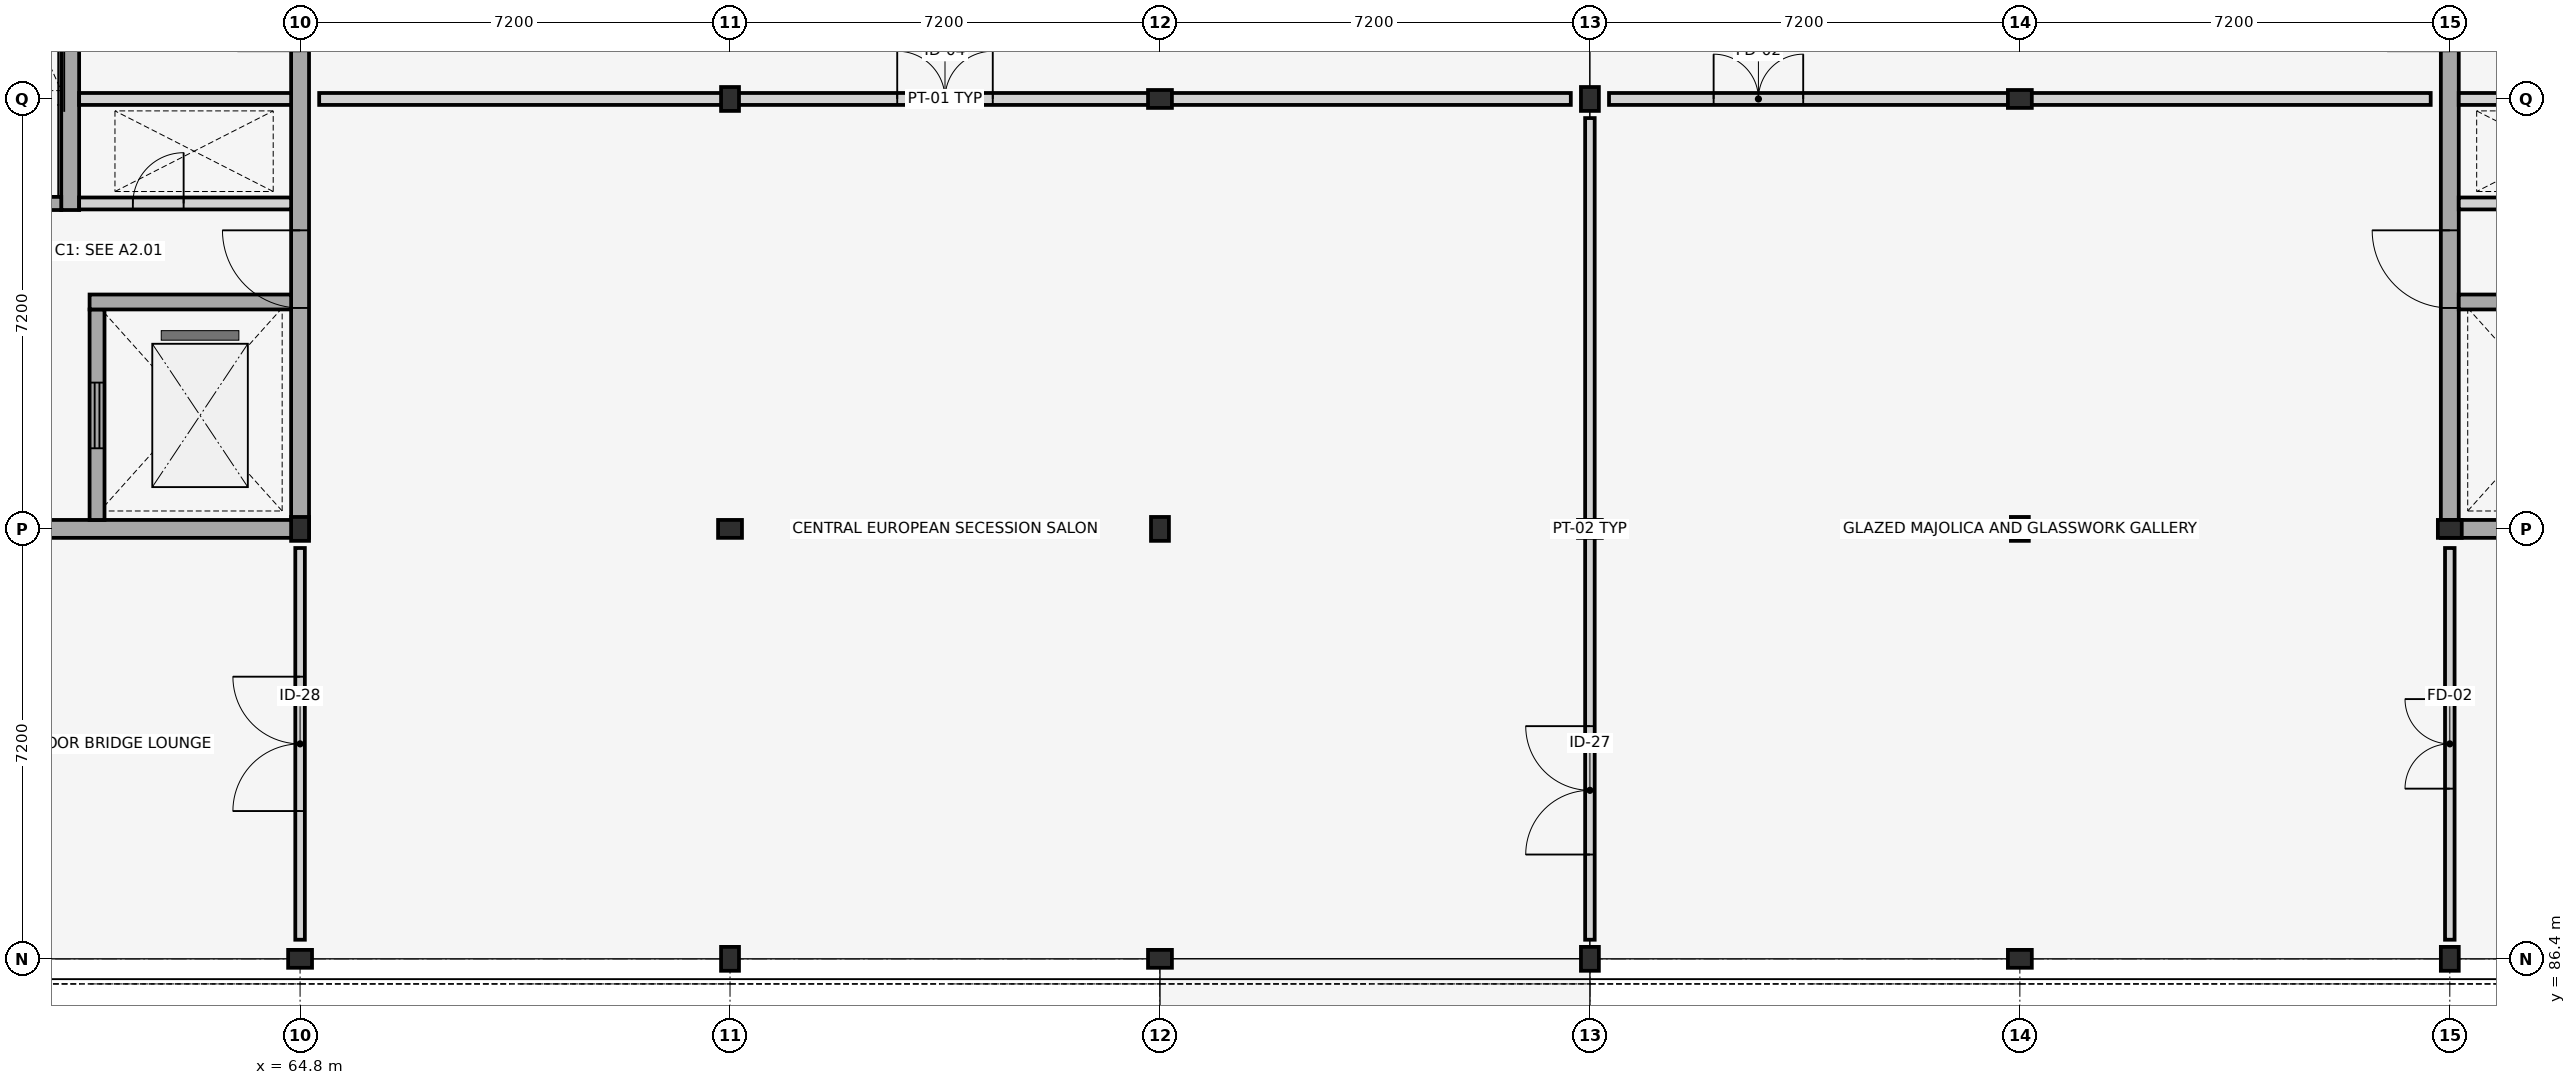
"""IFC4 building model, lengths in metres.
Left out: names, types, materials, properties, quantities, classifications, styles, units other than length and angle.
Written with IfcOpenShell. Run it as: python <this file> out.ifc"""

import sys

from ifc_helpers import new_model, si_unit, direction, frame, frame_2d, origin, origin_2d, place, context, subcontext, project, spatial, rectangle, i_section, extrude, element, fill, save


model = new_model("IFC4")
c1 = context("Model", 3, precision=1e-05, world=origin(), true_north=direction((0.0, 1.0)))
c2 = subcontext(c1, "Body", "Model", "MODEL_VIEW")
j1 = project(units=[si_unit("LENGTHUNIT", "METRE"), si_unit("PLANEANGLEUNIT", "RADIAN")], contexts=[c1])
p1 = place(None, origin())
s1 = spatial("IfcSite", under=j1, at=p1, CompositionType="ELEMENT")
p2 = place(p1, origin())
s2 = spatial("IfcBuilding", under=s1, at=p2, CompositionType="ELEMENT")
p3 = place(p2, frame((0.0, 0.0, 8.7)))
s3 = spatial("IfcBuildingStorey", under=s2, at=p3, CompositionType="ELEMENT", Elevation=8.7)
for number, where, z_axis, x_axis in (
    (1, (64.8, 86.4, 0.0), (0.0, 0.0, 1.0), (0.0, 1.0, 0.0)),
    (2, (64.8, 93.6, 0.0), (0.0, 0.0, 1.0), (1.0, 0.0, 0.0)),
    (3, (72.0, 86.4, 0.0), (0.0, 0.0, 1.0), (1.0, 0.0, 0.0)),
    (4, (72.0, 93.6, 0.0), (0.0, 0.0, 1.0), (0.0, 1.0, 0.0)),
    (5, (72.0, 100.8, 0.0), (0.0, 0.0, 1.0), (1.0, 0.0, 0.0)),
    (6, (79.2, 86.4, 0.0), (0.0, 0.0, 1.0), (0.0, 1.0, 0.0)),
    (7, (79.2, 93.6, 0.0), (0.0, 0.0, 1.0), (1.0, 0.0, 0.0)),
    (8, (79.2, 100.8, 0.0), (0.0, 0.0, 1.0), (0.0, 1.0, 0.0)),
    (9, (86.4, 86.4, 0.0), (0.0, 0.0, 1.0), (1.0, 0.0, 0.0)),
    (10, (86.4, 93.6, 0.0), (0.0, 0.0, 1.0), (0.0, 1.0, 0.0)),
    (11, (86.4, 100.8, 0.0), (0.0, 0.0, 1.0), (1.0, 0.0, 0.0)),
    (12, (93.6, 86.4, 0.0), (0.0, 0.0, 1.0), (0.0, 1.0, 0.0)),
    (13, (93.6, 93.6, 0.0), (0.0, 0.0, 1.0), (1.0, 0.0, 0.0)),
    (14, (93.6, 100.8, 0.0), (0.0, 0.0, 1.0), (0.0, 1.0, 0.0)),
    (15, (100.8, 86.4, 0.0), (0.0, 0.0, 1.0), (1.0, 0.0, 0.0)),
    (16, (100.8, 93.6, 0.0), (0.0, 0.0, 1.0), (0.0, 1.0, 0.0)),
):
    element("IfcColumn", number, at=place(p3, frame(where, z_axis=z_axis, x_axis=x_axis)), inside=s3, PredefinedType="COLUMN", context=c2, shape_type="SweptSolid", body=[
        extrude(i_section(OverallWidth=0.3, OverallDepth=0.4, WebThickness=0.013, FlangeThickness=0.024, FilletRadius=0.027, at=origin_2d()), origin(), (0.0, 0.0, 1.0), 4.2),
    ])
p4 = place(p3, frame((57.6, 93.6, 0.0), z_axis=(0.0, 0.0, 1.0), x_axis=(1.0, 0.0, 0.0)))
e17 = element("IfcWall", 17, at=p4, inside=s3, PredefinedType="SHEAR", context=c2, shape_type="SweptSolid", body=[
    extrude(rectangle(XDim=7.35, YDim=0.3, at=frame_2d((3.675, 0.0))), origin(), (0.0, 0.0, 1.0), 3.96),
])
p5 = place(p3, frame((64.8, 93.75, 0.0), z_axis=(0.0, 0.0, 1.0), x_axis=(0.0, 1.0, 0.0)))
e18 = element("IfcWall", 18, at=p5, inside=s3, PredefinedType="SHEAR", context=c2, shape_type="SweptSolid", body=[
    extrude(rectangle(XDim=14.1, YDim=0.3, at=frame_2d((7.05, 0.0))), origin(), (0.0, 0.0, 1.0), 3.96),
])
p6 = place(p5, frame((3.55, 0.0, 0.0)))
e19 = element("IfcOpeningElement", 19, at=p6, cuts=e18, PredefinedType="OPENING", context=c2, shape_type="SweptSolid", body=[
    extrude(rectangle(XDim=1.3, YDim=2.2, at=frame_2d((0.65, 1.1))), frame((0.0, 0.16, 0.0), z_axis=(0.0, -1.0, 0.0), x_axis=(1.0, 0.0, 0.0)), (0.0, 0.0, 1.0), 0.32),
])
p7 = place(p5, frame((7.85, 0.0, 0.0)))
e20 = element("IfcOpeningElement", 20, at=p7, cuts=e18, PredefinedType="OPENING", context=c2, shape_type="SweptSolid", body=[
    extrude(rectangle(XDim=1.05, YDim=2.15, at=frame_2d((0.525, 1.075))), frame((0.0, 0.16, 0.0), z_axis=(0.0, -1.0, 0.0), x_axis=(1.0, 0.0, 0.0)), (0.0, 0.0, 1.0), 0.32),
])
p8 = place(p5, frame((10.55, 0.0, 0.0)))
e21 = element("IfcOpeningElement", 21, at=p8, cuts=e18, PredefinedType="OPENING", context=c2, shape_type="SweptSolid", body=[
    extrude(rectangle(XDim=1.0, YDim=2.15, at=frame_2d((0.5, 1.075))), frame((0.0, 0.16, 0.0), z_axis=(0.0, -1.0, 0.0), x_axis=(1.0, 0.0, 0.0)), (0.0, 0.0, 1.0), 0.32),
])
p9 = place(p3, frame((61.4, 93.75, 0.0), z_axis=(0.0, 0.0, 1.0), x_axis=(0.0, 1.0, 0.0)))
e22 = element("IfcWall", 22, at=p9, inside=s3, PredefinedType="SHEAR", context=c2, shape_type="SweptSolid", body=[
    extrude(rectangle(XDim=3.525, YDim=0.25, at=frame_2d((1.762, 0.0))), origin(), (0.0, 0.0, 1.0), 3.96),
])
p10 = place(p9, frame((1.2, 0.0, 0.0)))
e23 = element("IfcOpeningElement", 23, at=p10, cuts=e22, PredefinedType="OPENING", context=c2, shape_type="SweptSolid", body=[
    extrude(rectangle(XDim=1.1, YDim=2.15, at=frame_2d((0.55, 1.075))), frame((0.0, 0.135, 0.0), z_axis=(0.0, -1.0, 0.0), x_axis=(1.0, 0.0, 0.0)), (0.0, 0.0, 1.0), 0.27),
])
p11 = place(p3, frame((60.95, 98.94, 0.0), z_axis=(0.0, 0.0, 1.0), x_axis=(0.0, 1.0, 0.0)))
e24 = element("IfcWall", 24, at=p11, inside=s3, PredefinedType="SHEAR", context=c2, shape_type="SweptSolid", body=[
    extrude(rectangle(XDim=8.91, YDim=0.3, at=frame_2d((4.455, 0.0))), origin(), (0.0, 0.0, 1.0), 3.96),
])
p12 = place(p3, frame((61.1, 99.05, 0.0), z_axis=(0.0, 0.0, 1.0), x_axis=(1.0, 0.0, 0.0)))
e25 = element("IfcWall", 25, at=p12, inside=s3, PredefinedType="PLUMBINGWALL", context=c2, shape_type="SweptSolid", body=[
    extrude(rectangle(XDim=3.55, YDim=0.2, at=frame_2d((1.775, 0.0))), origin(), (0.0, 0.0, 1.0), 3.38),
])
p13 = place(p12, frame((0.9, 0.0, 0.0)))
e26 = element("IfcOpeningElement", 26, at=p13, cuts=e25, PredefinedType="OPENING", context=c2, shape_type="SweptSolid", body=[
    extrude(rectangle(XDim=0.85, YDim=2.05, at=frame_2d((0.425, 1.025))), frame((0.0, 0.11, 0.0), z_axis=(0.0, -1.0, 0.0), x_axis=(1.0, 0.0, 0.0)), (0.0, 0.0, 1.0), 0.22),
])
p14 = place(p3, frame((57.9, 99.05, 0.0), z_axis=(0.0, 0.0, 1.0), x_axis=(1.0, 0.0, 0.0)))
e27 = element("IfcWall", 27, at=p14, inside=s3, PredefinedType="SHEAR", context=c2, shape_type="SweptSolid", body=[
    extrude(rectangle(XDim=2.9, YDim=0.22, at=frame_2d((1.45, 0.0))), origin(), (0.0, 0.0, 1.0), 3.96),
])
p15 = place(p14, frame((0.75, 0.0, 0.0)))
e28 = element("IfcOpeningElement", 28, at=p15, cuts=e27, PredefinedType="OPENING", context=c2, shape_type="SweptSolid", body=[
    extrude(rectangle(XDim=1.3, YDim=2.2, at=frame_2d((0.65, 1.1))), frame((0.0, 0.12, 0.0), z_axis=(0.0, -1.0, 0.0), x_axis=(1.0, 0.0, 0.0)), (0.0, 0.0, 1.0), 0.24),
])
p16 = place(p3, frame((61.275, 97.4, 0.0), z_axis=(0.0, 0.0, 1.0), x_axis=(1.0, 0.0, 0.0)))
e29 = element("IfcWall", 29, at=p16, inside=s3, PredefinedType="SHEAR", context=c2, shape_type="SweptSolid", body=[
    extrude(rectangle(XDim=3.375, YDim=0.25, at=frame_2d((1.688, 0.0))), origin(), (0.0, 0.0, 1.0), 3.96),
])
p17 = place(p3, frame((61.1, 100.8, 0.0), z_axis=(0.0, 0.0, 1.0), x_axis=(1.0, 0.0, 0.0)))
e30 = element("IfcWall", 30, at=p17, inside=s3, PredefinedType="PLUMBINGWALL", context=c2, shape_type="SweptSolid", body=[
    extrude(rectangle(XDim=3.55, YDim=0.2, at=frame_2d((1.775, 0.0))), origin(), (0.0, 0.0, 1.0), 3.38),
])
p18 = place(p3, frame((100.65, 93.6, 0.0), z_axis=(0.0, 0.0, 1.0), x_axis=(1.0, 0.0, 0.0)))
e31 = element("IfcWall", 31, at=p18, inside=s3, PredefinedType="SHEAR", context=c2, shape_type="SweptSolid", body=[
    extrude(rectangle(XDim=7.35, YDim=0.3, at=frame_2d((3.675, 0.0))), origin(), (0.0, 0.0, 1.0), 3.96),
])
p19 = place(p3, frame((100.8, 93.75, 0.0), z_axis=(0.0, 0.0, 1.0), x_axis=(0.0, 1.0, 0.0)))
e32 = element("IfcWall", 32, at=p19, inside=s3, PredefinedType="SHEAR", context=c2, shape_type="SweptSolid", body=[
    extrude(rectangle(XDim=14.1, YDim=0.3, at=frame_2d((7.05, 0.0))), origin(), (0.0, 0.0, 1.0), 3.96),
])
p20 = place(p19, frame((3.55, 0.0, 0.0)))
e33 = element("IfcOpeningElement", 33, at=p20, cuts=e32, PredefinedType="OPENING", context=c2, shape_type="SweptSolid", body=[
    extrude(rectangle(XDim=1.3, YDim=2.2, at=frame_2d((0.65, 1.1))), frame((0.0, 0.16, 0.0), z_axis=(0.0, -1.0, 0.0), x_axis=(1.0, 0.0, 0.0)), (0.0, 0.0, 1.0), 0.32),
])
p21 = place(p19, frame((7.85, 0.0, 0.0)))
e34 = element("IfcOpeningElement", 34, at=p21, cuts=e32, PredefinedType="OPENING", context=c2, shape_type="SweptSolid", body=[
    extrude(rectangle(XDim=1.05, YDim=2.15, at=frame_2d((0.525, 1.075))), frame((0.0, 0.16, 0.0), z_axis=(0.0, -1.0, 0.0), x_axis=(1.0, 0.0, 0.0)), (0.0, 0.0, 1.0), 0.32),
])
p22 = place(p19, frame((10.55, 0.0, 0.0)))
e35 = element("IfcOpeningElement", 35, at=p22, cuts=e32, PredefinedType="OPENING", context=c2, shape_type="SweptSolid", body=[
    extrude(rectangle(XDim=1.0, YDim=2.15, at=frame_2d((0.5, 1.075))), frame((0.0, 0.16, 0.0), z_axis=(0.0, -1.0, 0.0), x_axis=(1.0, 0.0, 0.0)), (0.0, 0.0, 1.0), 0.32),
])
p23 = place(p3, frame((100.95, 99.05, 0.0), z_axis=(0.0, 0.0, 1.0), x_axis=(1.0, 0.0, 0.0)))
e36 = element("IfcWall", 36, at=p23, inside=s3, PredefinedType="PLUMBINGWALL", context=c2, shape_type="SweptSolid", body=[
    extrude(rectangle(XDim=3.55, YDim=0.2, at=frame_2d((1.775, 0.0))), origin(), (0.0, 0.0, 1.0), 3.38),
])
p24 = place(p23, frame((0.9, 0.0, 0.0)))
e37 = element("IfcOpeningElement", 37, at=p24, cuts=e36, PredefinedType="OPENING", context=c2, shape_type="SweptSolid", body=[
    extrude(rectangle(XDim=0.85, YDim=2.05, at=frame_2d((0.425, 1.025))), frame((0.0, 0.11, 0.0), z_axis=(0.0, -1.0, 0.0), x_axis=(1.0, 0.0, 0.0)), (0.0, 0.0, 1.0), 0.22),
])
p25 = place(p3, frame((100.95, 97.4, 0.0), z_axis=(0.0, 0.0, 1.0), x_axis=(1.0, 0.0, 0.0)))
e38 = element("IfcWall", 38, at=p25, inside=s3, PredefinedType="SHEAR", context=c2, shape_type="SweptSolid", body=[
    extrude(rectangle(XDim=3.375, YDim=0.25, at=frame_2d((1.688, 0.0))), origin(), (0.0, 0.0, 1.0), 3.96),
])
p26 = place(p3, frame((100.95, 100.8, 0.0), z_axis=(0.0, 0.0, 1.0), x_axis=(1.0, 0.0, 0.0)))
e39 = element("IfcWall", 39, at=p26, inside=s3, PredefinedType="PLUMBINGWALL", context=c2, shape_type="SweptSolid", body=[
    extrude(rectangle(XDim=3.55, YDim=0.2, at=frame_2d((1.775, 0.0))), origin(), (0.0, 0.0, 1.0), 3.38),
])
p27 = place(p3, frame((65.12, 100.8, 0.0), z_axis=(0.0, 0.0, 1.0), x_axis=(1.0, 0.0, 0.0)))
e40 = element("IfcWall", 40, at=p27, inside=s3, PredefinedType="PARTITIONING", context=c2, shape_type="SweptSolid", body=[
    extrude(rectangle(XDim=20.96, YDim=0.2, at=frame_2d((10.48, 0.0))), origin(), (0.0, 0.0, 1.0), 3.15),
])
p28 = place(p27, frame((9.68, 0.0, 0.0)))
e41 = element("IfcOpeningElement", 41, at=p28, cuts=e40, PredefinedType="OPENING", context=c2, shape_type="SweptSolid", body=[
    extrude(rectangle(XDim=1.6, YDim=2.35, at=frame_2d((0.8, 1.175))), frame((0.0, 0.11, 0.0), z_axis=(0.0, -1.0, 0.0), x_axis=(1.0, 0.0, 0.0)), (0.0, 0.0, 1.0), 0.22),
])
p29 = place(p3, frame((86.72, 100.8, 0.0), z_axis=(0.0, 0.0, 1.0), x_axis=(1.0, 0.0, 0.0)))
e42 = element("IfcWall", 42, at=p29, inside=s3, PredefinedType="PARTITIONING", context=c2, shape_type="SweptSolid", body=[
    extrude(rectangle(XDim=13.76, YDim=0.2, at=frame_2d((6.88, 0.0))), origin(), (0.0, 0.0, 1.0), 3.15),
])
p30 = place(p29, frame((1.752, 0.0, 0.0)))
e43 = element("IfcOpeningElement", 43, at=p30, cuts=e42, PredefinedType="OPENING", context=c2, shape_type="SweptSolid", body=[
    extrude(rectangle(XDim=1.5, YDim=2.25, at=frame_2d((0.75, 1.125))), frame((0.0, 0.11, 0.0), z_axis=(0.0, -1.0, 0.0), x_axis=(1.0, 0.0, 0.0)), (0.0, 0.0, 1.0), 0.22),
])
p31 = place(p3, frame((86.4, 86.72, 0.0), z_axis=(0.0, 0.0, 1.0), x_axis=(0.0, 1.0, 0.0)))
e44 = element("IfcWall", 44, at=p31, inside=s3, PredefinedType="PARTITIONING", context=c2, shape_type="SweptSolid", body=[
    extrude(rectangle(XDim=13.76, YDim=0.16, at=frame_2d((6.88, 0.0))), origin(), (0.0, 0.0, 1.0), 3.15),
])
p32 = place(p31, frame((1.427, 0.0, 0.0)))
e45 = element("IfcOpeningElement", 45, at=p32, cuts=e44, PredefinedType="OPENING", context=c2, shape_type="SweptSolid", body=[
    extrude(rectangle(XDim=2.15, YDim=2.65, at=frame_2d((1.075, 1.325))), frame((0.0, 0.09, 0.0), z_axis=(0.0, -1.0, 0.0), x_axis=(1.0, 0.0, 0.0)), (0.0, 0.0, 1.0), 0.18),
])
p33 = place(p3, frame((64.8, 86.72, 0.0), z_axis=(0.0, 0.0, 1.0), x_axis=(0.0, 1.0, 0.0)))
e46 = element("IfcWall", 46, at=p33, inside=s3, PredefinedType="PARTITIONING", context=c2, shape_type="SweptSolid", body=[
    extrude(rectangle(XDim=6.56, YDim=0.16, at=frame_2d((3.28, 0.0))), origin(), (0.0, 0.0, 1.0), 3.15),
])
p34 = place(p33, frame((2.155, 0.0, 0.0)))
e47 = element("IfcOpeningElement", 47, at=p34, cuts=e46, PredefinedType="OPENING", context=c2, shape_type="SweptSolid", body=[
    extrude(rectangle(XDim=2.25, YDim=2.7, at=frame_2d((1.125, 1.35))), frame((0.0, 0.09, 0.0), z_axis=(0.0, -1.0, 0.0), x_axis=(1.0, 0.0, 0.0)), (0.0, 0.0, 1.0), 0.18),
])
p35 = place(p3, frame((100.8, 86.72, 0.0), z_axis=(0.0, 0.0, 1.0), x_axis=(0.0, 1.0, 0.0)))
e48 = element("IfcWall", 48, at=p35, inside=s3, PredefinedType="PARTITIONING", context=c2, shape_type="SweptSolid", body=[
    extrude(rectangle(XDim=6.56, YDim=0.16, at=frame_2d((3.28, 0.0))), origin(), (0.0, 0.0, 1.0), 3.15),
])
p36 = place(p35, frame((2.53, 0.0, 0.0)))
e49 = element("IfcOpeningElement", 49, at=p36, cuts=e48, PredefinedType="OPENING", context=c2, shape_type="SweptSolid", body=[
    extrude(rectangle(XDim=1.5, YDim=2.25, at=frame_2d((0.75, 1.125))), frame((0.0, 0.09, 0.0), z_axis=(0.0, -1.0, 0.0), x_axis=(1.0, 0.0, 0.0)), (0.0, 0.0, 1.0), 0.18),
])
p37 = place(p6, origin())
e50 = element("IfcDoor", 50, at=p37, inside=s3, OperationType="SINGLE_SWING_RIGHT", PredefinedType="DOOR", context=c2, shape_type="SweptSolid", body=[
    extrude(rectangle(XDim=1.3, YDim=2.2, at=frame_2d((0.65, 1.1))), frame((0.0, 0.025, 0.0), z_axis=(0.0, -1.0, 0.0), x_axis=(1.0, 0.0, 0.0)), (0.0, 0.0, 1.0), 0.05),
])
fill(e19, e50)
p38 = place(p10, origin())
e51 = element("IfcDoor", 51, at=p38, inside=s3, OperationType="SLIDING_TO_LEFT", PredefinedType="DOOR", context=c2, shape_type="SweptSolid", body=[
    extrude(rectangle(XDim=1.1, YDim=2.15, at=frame_2d((0.55, 1.075))), frame((0.0, 0.025, 0.0), z_axis=(0.0, -1.0, 0.0), x_axis=(1.0, 0.0, 0.0)), (0.0, 0.0, 1.0), 0.05),
])
fill(e23, e51)
p39 = place(p13, origin())
e52 = element("IfcDoor", 52, at=p39, inside=s3, OperationType="SINGLE_SWING_RIGHT", PredefinedType="TRAPDOOR", context=c2, shape_type="SweptSolid", body=[
    extrude(rectangle(XDim=0.85, YDim=2.05, at=frame_2d((0.425, 1.025))), frame((0.0, 0.025, 0.0), z_axis=(0.0, -1.0, 0.0), x_axis=(1.0, 0.0, 0.0)), (0.0, 0.0, 1.0), 0.05),
])
fill(e26, e52)
p40 = place(p20, origin())
e53 = element("IfcDoor", 53, at=p40, inside=s3, OperationType="SINGLE_SWING_RIGHT", PredefinedType="DOOR", context=c2, shape_type="SweptSolid", body=[
    extrude(rectangle(XDim=1.3, YDim=2.2, at=frame_2d((0.65, 1.1))), frame((0.0, 0.025, 0.0), z_axis=(0.0, -1.0, 0.0), x_axis=(1.0, 0.0, 0.0)), (0.0, 0.0, 1.0), 0.05),
])
fill(e33, e53)
p41 = place(p28, origin())
e54 = element("IfcDoor", 54, at=p41, inside=s3, OperationType="DOUBLE_DOOR_SINGLE_SWING", PredefinedType="DOOR", context=c2, shape_type="SweptSolid", body=[
    extrude(rectangle(XDim=1.6, YDim=2.35, at=frame_2d((0.8, 1.175))), frame((0.0, 0.025, 0.0), z_axis=(0.0, -1.0, 0.0), x_axis=(1.0, 0.0, 0.0)), (0.0, 0.0, 1.0), 0.05),
])
fill(e41, e54)
p42 = place(p30, origin())
e55 = element("IfcDoor", 55, at=p42, inside=s3, OperationType="DOUBLE_DOOR_SINGLE_SWING", PredefinedType="DOOR", context=c2, shape_type="SweptSolid", body=[
    extrude(rectangle(XDim=1.5, YDim=2.25, at=frame_2d((0.75, 1.125))), frame((0.0, 0.025, 0.0), z_axis=(0.0, -1.0, 0.0), x_axis=(1.0, 0.0, 0.0)), (0.0, 0.0, 1.0), 0.05),
])
fill(e43, e55)
p43 = place(p32, origin())
e56 = element("IfcDoor", 56, at=p43, inside=s3, OperationType="DOUBLE_DOOR_SINGLE_SWING", PredefinedType="DOOR", context=c2, shape_type="SweptSolid", body=[
    extrude(rectangle(XDim=2.15, YDim=2.65, at=frame_2d((1.075, 1.325))), frame((0.0, 0.025, 0.0), z_axis=(0.0, -1.0, 0.0), x_axis=(1.0, 0.0, 0.0)), (0.0, 0.0, 1.0), 0.05),
])
fill(e45, e56)
p44 = place(p34, origin())
e57 = element("IfcDoor", 57, at=p44, inside=s3, OperationType="DOUBLE_DOOR_SINGLE_SWING", PredefinedType="DOOR", context=c2, shape_type="SweptSolid", body=[
    extrude(rectangle(XDim=2.25, YDim=2.7, at=frame_2d((1.125, 1.35))), frame((0.0, 0.025, 0.0), z_axis=(0.0, -1.0, 0.0), x_axis=(1.0, 0.0, 0.0)), (0.0, 0.0, 1.0), 0.05),
])
fill(e47, e57)
p45 = place(p36, origin())
e58 = element("IfcDoor", 58, at=p45, inside=s3, OperationType="DOUBLE_DOOR_SINGLE_SWING", PredefinedType="DOOR", context=c2, shape_type="SweptSolid", body=[
    extrude(rectangle(XDim=1.5, YDim=2.25, at=frame_2d((0.75, 1.125))), frame((0.0, 0.025, 0.0), z_axis=(0.0, -1.0, 0.0), x_axis=(1.0, 0.0, 0.0)), (0.0, 0.0, 1.0), 0.05),
])
fill(e49, e58)
save(model, sys.argv[1])
